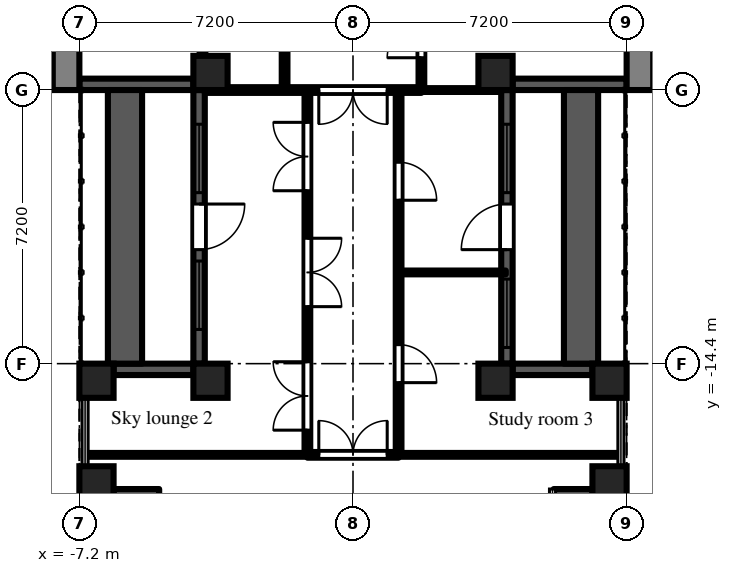
"""IFC4 building model, lengths in metres.
Left out: names, types, materials, properties, quantities, classifications, styles, units other than length and angle.
Written with IfcOpenShell. Run it as: python <this file> out.ifc"""

import sys

from ifc_helpers import new_model, si_unit, direction, frame, frame_2d, origin, origin_2d, place, context, subcontext, project, spatial, rectangle, extrude, element, fill, save


model = new_model("IFC4")
c1 = context("Model", 3, precision=1e-05, world=origin(), true_north=direction((0.0, 1.0)))
c2 = subcontext(c1, "Body", "Model", "MODEL_VIEW")
j1 = project(units=[si_unit("LENGTHUNIT", "METRE"), si_unit("PLANEANGLEUNIT", "RADIAN")], contexts=[c1])
p1 = place(None, origin())
s1 = spatial("IfcSite", under=j1, at=p1, CompositionType="ELEMENT")
p2 = place(p1, origin())
s2 = spatial("IfcBuilding", under=s1, at=p2, CompositionType="ELEMENT")
p3 = place(p2, frame((0.0, 0.0, 116.1)))
s3 = spatial("IfcBuildingStorey", under=s2, at=p3, CompositionType="ELEMENT", Elevation=116.1)
for number, where, z_axis, x_axis in (
    (1, (-6.75, -17.55, 0.0), (0.0, 0.0, 1.0), (1.0, 0.0, 0.0)),
    (2, (-6.75, -14.85, 0.0), (0.0, 0.0, 1.0), (1.0, 0.0, 0.0)),
    (3, (-3.75, -14.85, 0.0), (0.0, 0.0, 1.0), (1.0, 0.0, 0.0)),
    (4, (-3.75, -6.75, 0.0), (0.0, 0.0, 1.0), (1.0, 0.0, 0.0)),
    (5, (3.75, -14.85, 0.0), (0.0, 0.0, 1.0), (1.0, 0.0, 0.0)),
    (6, (3.75, -6.75, 0.0), (0.0, 0.0, 1.0), (1.0, 0.0, 0.0)),
    (7, (6.75, -17.55, 0.0), (0.0, 0.0, 1.0), (1.0, 0.0, 0.0)),
    (8, (6.75, -14.85, 0.0), (0.0, 0.0, 1.0), (1.0, 0.0, 0.0)),
):
    element("IfcColumn", number, at=place(p3, frame(where, z_axis=z_axis, x_axis=x_axis)), inside=s3, PredefinedType="COLUMN", context=c2, shape_type="SweptSolid", body=[
        extrude(rectangle(XDim=0.9, YDim=0.9, at=origin_2d()), origin(), (0.0, 0.0, 1.0), 4.2),
    ])
p4 = place(p3, frame((-7.2, -7.05, 0.0), z_axis=(0.0, 0.0, 1.0), x_axis=(1.0, 0.0, 0.0)))
e9 = element("IfcWall", 9, at=p4, inside=s3, PredefinedType="SOLIDWALL", context=c2, shape_type="SweptSolid", body=[
    extrude(rectangle(XDim=3.0, YDim=0.3, at=frame_2d((1.5, 0.0))), origin(), (0.0, 0.0, 1.0), 3.4),
])
p5 = place(p3, frame((-4.05, -7.2, 0.0), z_axis=(0.0, 0.0, 1.0), x_axis=(0.0, -1.0, 0.0)))
e10 = element("IfcWall", 10, at=p5, inside=s3, PredefinedType="SOLIDWALL", context=c2, shape_type="SweptSolid", body=[
    extrude(rectangle(XDim=7.2, YDim=0.3, at=frame_2d((3.6, 0.0))), origin(), (0.0, 0.0, 1.0), 3.4),
])
p6 = place(p5, frame((3.0, 0.0, 0.0)))
e11 = element("IfcOpeningElement", 11, at=p6, cuts=e10, PredefinedType="OPENING", context=c2, shape_type="SweptSolid", body=[
    extrude(rectangle(XDim=1.2, YDim=2.05, at=frame_2d((0.6, 1.025))), frame((0.0, 0.16, 0.0), z_axis=(0.0, -1.0, 0.0), x_axis=(1.0, 0.0, 0.0)), (0.0, 0.0, 1.0), 0.32),
])
p7 = place(p5, frame((0.9, 0.0, 0.2)))
e12 = element("IfcOpeningElement", 12, at=p7, cuts=e10, PredefinedType="OPENING", context=c2, shape_type="SweptSolid", body=[
    extrude(rectangle(XDim=1.8, YDim=1.85, at=frame_2d((0.9, 0.925))), frame((0.0, 0.16, 0.0), z_axis=(0.0, -1.0, 0.0), x_axis=(1.0, 0.0, 0.0)), (0.0, 0.0, 1.0), 0.32),
])
p8 = place(p5, frame((4.5, 0.0, 0.2)))
e13 = element("IfcOpeningElement", 13, at=p8, cuts=e10, PredefinedType="OPENING", context=c2, shape_type="SweptSolid", body=[
    extrude(rectangle(XDim=1.8, YDim=1.85, at=frame_2d((0.9, 0.925))), frame((0.0, 0.16, 0.0), z_axis=(0.0, -1.0, 0.0), x_axis=(1.0, 0.0, 0.0)), (0.0, 0.0, 1.0), 0.32),
])
p9 = place(p3, frame((-4.2, -14.55, 0.0), z_axis=(0.0, 0.0, 1.0), x_axis=(-1.0, 0.0, 0.0)))
e14 = element("IfcWall", 14, at=p9, inside=s3, PredefinedType="SOLIDWALL", context=c2, shape_type="SweptSolid", body=[
    extrude(rectangle(XDim=2.1, YDim=0.3, at=frame_2d((1.05, 0.0))), origin(), (0.0, 0.0, 1.0), 3.4),
])
p10 = place(p3, frame((-6.3, -17.85, 0.0), z_axis=(0.0, 0.0, 1.0), x_axis=(1.0, 0.0, 0.0)))
e15 = element("IfcWall", 15, at=p10, inside=s3, PredefinedType="SOLIDWALL", context=c2, shape_type="SweptSolid", body=[
    extrude(rectangle(XDim=1.2, YDim=0.3, at=frame_2d((0.6, 0.0))), origin(), (0.0, 0.0, 1.0), 3.8),
])
p11 = place(p3, frame((5.28, -17.85, 0.0), z_axis=(0.0, 0.0, 1.0), x_axis=(1.0, 0.0, 0.0)))
e16 = element("IfcWall", 16, at=p11, inside=s3, PredefinedType="SOLIDWALL", context=c2, shape_type="SweptSolid", body=[
    extrude(rectangle(XDim=1.02, YDim=0.3, at=frame_2d((0.51, 0.0))), origin(), (0.0, 0.0, 1.0), 3.8),
])
p12 = place(p3, frame((6.3, -14.55, 0.0), z_axis=(0.0, 0.0, 1.0), x_axis=(-1.0, 0.0, 0.0)))
e17 = element("IfcWall", 17, at=p12, inside=s3, PredefinedType="SOLIDWALL", context=c2, shape_type="SweptSolid", body=[
    extrude(rectangle(XDim=2.1, YDim=0.3, at=frame_2d((1.05, 0.0))), origin(), (0.0, 0.0, 1.0), 3.4),
])
p13 = place(p3, frame((4.05, -14.4, 0.0), z_axis=(0.0, 0.0, 1.0), x_axis=(0.0, 1.0, 0.0)))
e18 = element("IfcWall", 18, at=p13, inside=s3, PredefinedType="SOLIDWALL", context=c2, shape_type="SweptSolid", body=[
    extrude(rectangle(XDim=7.2, YDim=0.3, at=frame_2d((3.6, 0.0))), origin(), (0.0, 0.0, 1.0), 3.4),
])
p14 = place(p13, frame((3.0, 0.0, 0.0)))
e19 = element("IfcOpeningElement", 19, at=p14, cuts=e18, PredefinedType="OPENING", context=c2, shape_type="SweptSolid", body=[
    extrude(rectangle(XDim=1.2, YDim=2.05, at=frame_2d((0.6, 1.025))), frame((0.0, 0.16, 0.0), z_axis=(0.0, -1.0, 0.0), x_axis=(1.0, 0.0, 0.0)), (0.0, 0.0, 1.0), 0.32),
])
p15 = place(p13, frame((0.425, 0.0, 0.2)))
e20 = element("IfcOpeningElement", 20, at=p15, cuts=e18, PredefinedType="OPENING", context=c2, shape_type="SweptSolid", body=[
    extrude(rectangle(XDim=1.8, YDim=1.85, at=frame_2d((0.9, 0.925))), frame((0.0, 0.16, 0.0), z_axis=(0.0, -1.0, 0.0), x_axis=(1.0, 0.0, 0.0)), (0.0, 0.0, 1.0), 0.32),
])
p16 = place(p13, frame((4.5, 0.0, 0.2)))
e21 = element("IfcOpeningElement", 21, at=p16, cuts=e18, PredefinedType="OPENING", context=c2, shape_type="SweptSolid", body=[
    extrude(rectangle(XDim=1.8, YDim=1.85, at=frame_2d((0.9, 0.925))), frame((0.0, 0.16, 0.0), z_axis=(0.0, -1.0, 0.0), x_axis=(1.0, 0.0, 0.0)), (0.0, 0.0, 1.0), 0.32),
])
p17 = place(p3, frame((4.2, -7.05, 0.0), z_axis=(0.0, 0.0, 1.0), x_axis=(1.0, 0.0, 0.0)))
e22 = element("IfcWall", 22, at=p17, inside=s3, PredefinedType="SOLIDWALL", context=c2, shape_type="SweptSolid", body=[
    extrude(rectangle(XDim=3.0, YDim=0.3, at=frame_2d((1.5, 0.0))), origin(), (0.0, 0.0, 1.0), 3.4),
])
for number, where, z_axis, x_axis in (
    (23, (6.0, -14.4, 0.0), (0.0, 0.0, 1.0), (0.0, 1.0, 0.0)),
    (24, (-6.0, -14.4, 0.0), (0.0, 0.0, 1.0), (0.0, 1.0, 0.0)),
):
    element("IfcWall", number, at=place(p3, frame(where, z_axis=z_axis, x_axis=x_axis)), inside=s3, PredefinedType="PARAPET", context=c2, shape_type="SweptSolid", body=[
        extrude(rectangle(XDim=7.2, YDim=0.9, at=frame_2d((3.6, 0.0))), origin(), (0.0, 0.0, 1.0), 0.8),
    ])
p18 = place(p3, frame((7.55, -7.2, 0.0), z_axis=(0.0, 0.0, 1.0), x_axis=(0.0, 1.0, 0.0)))
e25 = element("IfcWall", 25, at=p18, inside=s3, PredefinedType="SHEAR", context=c2, shape_type="SweptSolid", body=[
    extrude(rectangle(XDim=14.4, YDim=0.7, at=frame_2d((7.2, 0.0))), origin(), (0.0, 0.0, 1.0), 3.8),
])
p19 = place(p18, frame((6.0, 0.0, 0.0)))
e26 = element("IfcOpeningElement", 26, at=p19, cuts=e25, PredefinedType="OPENING", context=c2, shape_type="SweptSolid", body=[
    extrude(rectangle(XDim=2.4, YDim=2.2, at=frame_2d((1.2, 1.1))), frame((0.0, 0.36, 0.0), z_axis=(0.0, -1.0, 0.0), x_axis=(1.0, 0.0, 0.0)), (0.0, 0.0, 1.0), 0.72),
])
p20 = place(p3, frame((-7.55, -7.2, 0.0), z_axis=(0.0, 0.0, 1.0), x_axis=(0.0, 1.0, 0.0)))
e27 = element("IfcWall", 27, at=p20, inside=s3, PredefinedType="SHEAR", context=c2, shape_type="SweptSolid", body=[
    extrude(rectangle(XDim=14.4, YDim=0.7, at=frame_2d((7.2, 0.0))), origin(), (0.0, 0.0, 1.0), 3.8),
])
p21 = place(p20, frame((6.0, 0.0, 0.0)))
e28 = element("IfcOpeningElement", 28, at=p21, cuts=e27, PredefinedType="OPENING", context=c2, shape_type="SweptSolid", body=[
    extrude(rectangle(XDim=2.4, YDim=2.2, at=frame_2d((1.2, 1.1))), frame((0.0, 0.36, 0.0), z_axis=(0.0, -1.0, 0.0), x_axis=(1.0, 0.0, 0.0)), (0.0, 0.0, 1.0), 0.72),
])
p22 = place(p3, frame((-7.02, -16.8, 0.0), z_axis=(0.0, 0.0, 1.0), x_axis=(1.0, 0.0, 0.0)))
e29 = element("IfcWall", 29, at=p22, inside=s3, PredefinedType="PARTITIONING", context=c2, shape_type="SweptSolid", body=[
    extrude(rectangle(XDim=5.82, YDim=0.1, at=frame_2d((2.91, 0.0))), origin(), (0.0, 0.0, 1.0), 3.8),
])
p23 = place(p3, frame((-3.96, -6.9, 0.0), z_axis=(0.0, 0.0, 1.0), x_axis=(0.0, 1.0, 0.0)))
e30 = element("IfcWall", 30, at=p23, inside=s3, PredefinedType="PARTITIONING", context=c2, shape_type="SweptSolid", body=[
    extrude(rectangle(XDim=5.025, YDim=0.15, at=frame_2d((2.512, 0.0))), origin(), (0.0, 0.0, 1.0), 3.8),
])
p24 = place(p23, frame((3.55, 0.0, 0.0)))
e31 = element("IfcOpeningElement", 31, at=p24, cuts=e30, PredefinedType="OPENING", context=c2, shape_type="SweptSolid", body=[
    extrude(rectangle(XDim=0.9, YDim=2.1, at=frame_2d((0.45, 1.05))), frame((0.0, 0.085, 0.0), z_axis=(0.0, -1.0, 0.0), x_axis=(1.0, 0.0, 0.0)), (0.0, 0.0, 1.0), 0.17),
])
p25 = place(p3, frame((-3.9, -7.2, 0.0), z_axis=(0.0, 0.0, 1.0), x_axis=(1.0, 0.0, 0.0)))
e32 = element("IfcWall", 32, at=p25, inside=s3, PredefinedType="PARTITIONING", context=c2, shape_type="SweptSolid", body=[
    extrude(rectangle(XDim=5.7, YDim=0.15, at=frame_2d((2.85, 0.0))), origin(), (0.0, 0.0, 1.0), 3.8),
])
p26 = place(p25, frame((3.0, 0.0, 0.0)))
e33 = element("IfcOpeningElement", 33, at=p26, cuts=e32, PredefinedType="OPENING", context=c2, shape_type="SweptSolid", body=[
    extrude(rectangle(XDim=1.8, YDim=2.1, at=frame_2d((0.9, 1.05))), frame((0.0, 0.085, 0.0), z_axis=(0.0, -1.0, 0.0), x_axis=(1.0, 0.0, 0.0)), (0.0, 0.0, 1.0), 0.17),
])
p27 = place(p3, frame((-1.8, -7.125, 0.0), z_axis=(0.0, 0.0, 1.0), x_axis=(0.0, 1.0, 0.0)))
e34 = element("IfcWall", 34, at=p27, inside=s3, PredefinedType="PARTITIONING", context=c2, shape_type="SweptSolid", body=[
    extrude(rectangle(XDim=5.4, YDim=0.15, at=frame_2d((2.7, 0.0))), origin(), (0.0, 0.0, 1.0), 3.8),
])
p28 = place(p27, frame((3.255, 0.0, 0.0)))
e35 = element("IfcOpeningElement", 35, at=p28, cuts=e34, PredefinedType="OPENING", context=c2, shape_type="SweptSolid", body=[
    extrude(rectangle(XDim=0.9, YDim=2.1, at=frame_2d((0.45, 1.05))), frame((0.0, 0.085, 0.0), z_axis=(0.0, -1.0, 0.0), x_axis=(1.0, 0.0, 0.0)), (0.0, 0.0, 1.0), 0.17),
])
p29 = place(p3, frame((-1.2, -16.725, 0.0), z_axis=(0.0, 0.0, 1.0), x_axis=(0.0, 1.0, 0.0)))
e36 = element("IfcWall", 36, at=p29, inside=s3, PredefinedType="PARTITIONING", context=c2, shape_type="SweptSolid", body=[
    extrude(rectangle(XDim=9.45, YDim=0.15, at=frame_2d((4.725, 0.0))), origin(), (0.0, 0.0, 1.0), 3.8),
])
p30 = place(p29, frame((0.575, 0.0, 0.0)))
e37 = element("IfcOpeningElement", 37, at=p30, cuts=e36, PredefinedType="OPENING", context=c2, shape_type="SweptSolid", body=[
    extrude(rectangle(XDim=1.8, YDim=2.1, at=frame_2d((0.9, 1.05))), frame((0.0, 0.085, 0.0), z_axis=(0.0, -1.0, 0.0), x_axis=(1.0, 0.0, 0.0)), (0.0, 0.0, 1.0), 0.17),
])
p31 = place(p29, frame((3.825, 0.0, 0.0)))
e38 = element("IfcOpeningElement", 38, at=p31, cuts=e36, PredefinedType="OPENING", context=c2, shape_type="SweptSolid", body=[
    extrude(rectangle(XDim=1.8, YDim=2.1, at=frame_2d((0.9, 1.05))), frame((0.0, 0.085, 0.0), z_axis=(0.0, -1.0, 0.0), x_axis=(1.0, 0.0, 0.0)), (0.0, 0.0, 1.0), 0.17),
])
p32 = place(p29, frame((6.875, 0.0, 0.0)))
e39 = element("IfcOpeningElement", 39, at=p32, cuts=e36, PredefinedType="OPENING", context=c2, shape_type="SweptSolid", body=[
    extrude(rectangle(XDim=1.8, YDim=2.1, at=frame_2d((0.9, 1.05))), frame((0.0, 0.085, 0.0), z_axis=(0.0, -1.0, 0.0), x_axis=(1.0, 0.0, 0.0)), (0.0, 0.0, 1.0), 0.17),
])
p33 = place(p3, frame((-1.2, -16.8, 0.0), z_axis=(0.0, 0.0, 1.0), x_axis=(1.0, 0.0, 0.0)))
e40 = element("IfcWall", 40, at=p33, inside=s3, PredefinedType="PARTITIONING", context=c2, shape_type="SweptSolid", body=[
    extrude(rectangle(XDim=2.4, YDim=0.15, at=frame_2d((1.2, 0.0))), origin(), (0.0, 0.0, 1.0), 3.8),
])
p34 = place(p33, frame((0.3, 0.0, 0.0)))
e41 = element("IfcOpeningElement", 41, at=p34, cuts=e40, PredefinedType="OPENING", context=c2, shape_type="SweptSolid", body=[
    extrude(rectangle(XDim=1.8, YDim=2.1, at=frame_2d((0.9, 1.05))), frame((0.0, 0.085, 0.0), z_axis=(0.0, -1.0, 0.0), x_axis=(1.0, 0.0, 0.0)), (0.0, 0.0, 1.0), 0.17),
])
p35 = place(p3, frame((1.2, -16.725, 0.0), z_axis=(0.0, 0.0, 1.0), x_axis=(0.0, 1.0, 0.0)))
e42 = element("IfcWall", 42, at=p35, inside=s3, PredefinedType="PARTITIONING", context=c2, shape_type="SweptSolid", body=[
    extrude(rectangle(XDim=9.45, YDim=0.15, at=frame_2d((4.725, 0.0))), origin(), (0.0, 0.0, 1.0), 3.8),
])
p36 = place(p35, frame((6.625, 0.0, 0.0)))
e43 = element("IfcOpeningElement", 43, at=p36, cuts=e42, PredefinedType="OPENING", context=c2, shape_type="SweptSolid", body=[
    extrude(rectangle(XDim=1.0, YDim=2.1, at=frame_2d((0.5, 1.05))), frame((0.0, 0.085, 0.0), z_axis=(0.0, -1.0, 0.0), x_axis=(1.0, 0.0, 0.0)), (0.0, 0.0, 1.0), 0.17),
])
p37 = place(p35, frame((1.825, 0.0, 0.0)))
e44 = element("IfcOpeningElement", 44, at=p37, cuts=e42, PredefinedType="OPENING", context=c2, shape_type="SweptSolid", body=[
    extrude(rectangle(XDim=1.0, YDim=2.1, at=frame_2d((0.5, 1.05))), frame((0.0, 0.085, 0.0), z_axis=(0.0, -1.0, 0.0), x_axis=(1.0, 0.0, 0.0)), (0.0, 0.0, 1.0), 0.17),
])
p38 = place(p3, frame((1.2, -16.8, 0.0), z_axis=(0.0, 0.0, 1.0), x_axis=(1.0, 0.0, 0.0)))
e45 = element("IfcWall", 45, at=p38, inside=s3, PredefinedType="PARTITIONING", context=c2, shape_type="SweptSolid", body=[
    extrude(rectangle(XDim=5.82, YDim=0.1, at=frame_2d((2.91, 0.0))), origin(), (0.0, 0.0, 1.0), 3.8),
])
p39 = place(p3, frame((1.275, -12.0, 0.0), z_axis=(0.0, 0.0, 1.0), x_axis=(1.0, 0.0, 0.0)))
e46 = element("IfcWall", 46, at=p39, inside=s3, PredefinedType="PARTITIONING", context=c2, shape_type="SweptSolid", body=[
    extrude(rectangle(XDim=2.745, YDim=0.1, at=frame_2d((1.373, 0.0))), origin(), (0.0, 0.0, 1.0), 3.8),
])
p40 = place(p3, frame((1.8, -7.125, 0.0), z_axis=(0.0, 0.0, 1.0), x_axis=(0.0, 1.0, 0.0)))
e47 = element("IfcWall", 47, at=p40, inside=s3, PredefinedType="PARTITIONING", context=c2, shape_type="SweptSolid", body=[
    extrude(rectangle(XDim=5.4, YDim=0.15, at=frame_2d((2.7, 0.0))), origin(), (0.0, 0.0, 1.0), 3.8),
])
p41 = place(p40, frame((0.775, 0.0, 0.0)))
e48 = element("IfcOpeningElement", 48, at=p41, cuts=e47, PredefinedType="OPENING", context=c2, shape_type="SweptSolid", body=[
    extrude(rectangle(XDim=1.8, YDim=2.1, at=frame_2d((0.9, 1.05))), frame((0.0, 0.085, 0.0), z_axis=(0.0, -1.0, 0.0), x_axis=(1.0, 0.0, 0.0)), (0.0, 0.0, 1.0), 0.17),
])
p42 = place(p3, frame((1.8, -7.2, 0.0), z_axis=(0.0, 0.0, 1.0), x_axis=(1.0, 0.0, 0.0)))
e49 = element("IfcWall", 49, at=p42, inside=s3, PredefinedType="PARTITIONING", context=c2, shape_type="SweptSolid", body=[
    extrude(rectangle(XDim=2.1, YDim=0.1, at=frame_2d((1.05, 0.0))), origin(), (0.0, 0.0, 1.0), 3.8),
])
p43 = place(p6, origin())
e50 = element("IfcDoor", 50, at=p43, inside=s3, OperationType="SINGLE_SWING_LEFT", PredefinedType="DOOR", context=c2, shape_type="SweptSolid", body=[
    extrude(rectangle(XDim=1.2, YDim=2.05, at=frame_2d((0.6, 1.025))), frame((0.0, 0.025, 0.0), z_axis=(0.0, -1.0, 0.0), x_axis=(1.0, 0.0, 0.0)), (0.0, 0.0, 1.0), 0.05),
])
fill(e11, e50)
p44 = place(p7, origin())
e51 = element("IfcWindow", 51, at=p44, inside=s3, PartitioningType="SINGLE_PANEL", PredefinedType="WINDOW", context=c2, shape_type="SweptSolid", body=[
    extrude(rectangle(XDim=1.8, YDim=1.85, at=frame_2d((0.9, 0.925))), frame((0.0, 0.03, 0.0), z_axis=(0.0, -1.0, 0.0), x_axis=(1.0, 0.0, 0.0)), (0.0, 0.0, 1.0), 0.06),
])
fill(e12, e51)
p45 = place(p8, origin())
e52 = element("IfcWindow", 52, at=p45, inside=s3, PartitioningType="SINGLE_PANEL", PredefinedType="WINDOW", context=c2, shape_type="SweptSolid", body=[
    extrude(rectangle(XDim=1.8, YDim=1.85, at=frame_2d((0.9, 0.925))), frame((0.0, 0.03, 0.0), z_axis=(0.0, -1.0, 0.0), x_axis=(1.0, 0.0, 0.0)), (0.0, 0.0, 1.0), 0.06),
])
fill(e13, e52)
p46 = place(p14, origin())
e53 = element("IfcDoor", 53, at=p46, inside=s3, OperationType="SINGLE_SWING_LEFT", PredefinedType="DOOR", context=c2, shape_type="SweptSolid", body=[
    extrude(rectangle(XDim=1.2, YDim=2.05, at=frame_2d((0.6, 1.025))), frame((0.0, 0.025, 0.0), z_axis=(0.0, -1.0, 0.0), x_axis=(1.0, 0.0, 0.0)), (0.0, 0.0, 1.0), 0.05),
])
fill(e19, e53)
p47 = place(p15, origin())
e54 = element("IfcWindow", 54, at=p47, inside=s3, PartitioningType="SINGLE_PANEL", PredefinedType="WINDOW", context=c2, shape_type="SweptSolid", body=[
    extrude(rectangle(XDim=1.8, YDim=1.85, at=frame_2d((0.9, 0.925))), frame((0.0, 0.03, 0.0), z_axis=(0.0, -1.0, 0.0), x_axis=(1.0, 0.0, 0.0)), (0.0, 0.0, 1.0), 0.06),
])
fill(e20, e54)
p48 = place(p16, origin())
e55 = element("IfcWindow", 55, at=p48, inside=s3, PartitioningType="SINGLE_PANEL", PredefinedType="WINDOW", context=c2, shape_type="SweptSolid", body=[
    extrude(rectangle(XDim=1.8, YDim=1.85, at=frame_2d((0.9, 0.925))), frame((0.0, 0.03, 0.0), z_axis=(0.0, -1.0, 0.0), x_axis=(1.0, 0.0, 0.0)), (0.0, 0.0, 1.0), 0.06),
])
fill(e21, e55)
p49 = place(p41, origin())
e56 = element("IfcDoor", 56, at=p49, inside=s3, OperationType="DOUBLE_DOOR_DOUBLE_SWING", PredefinedType="DOOR", context=c2, shape_type="SweptSolid", body=[
    extrude(rectangle(XDim=1.8, YDim=2.1, at=frame_2d((0.9, 1.05))), frame((0.0, 0.025, 0.0), z_axis=(0.0, -1.0, 0.0), x_axis=(1.0, 0.0, 0.0)), (0.0, 0.0, 1.0), 0.05),
])
fill(e48, e56)
p50 = place(p26, frame((1.8, 0.0, 0.0), z_axis=(0.0, 0.0, 1.0), x_axis=(-1.0, 0.0, 0.0)))
e57 = element("IfcDoor", 57, at=p50, inside=s3, OperationType="DOUBLE_DOOR_DOUBLE_SWING", PredefinedType="DOOR", context=c2, shape_type="SweptSolid", body=[
    extrude(rectangle(XDim=1.8, YDim=2.1, at=frame_2d((0.9, 1.05))), frame((0.0, 0.025, 0.0), z_axis=(0.0, -1.0, 0.0), x_axis=(1.0, 0.0, 0.0)), (0.0, 0.0, 1.0), 0.05),
])
fill(e33, e57)
p51 = place(p34, origin())
e58 = element("IfcDoor", 58, at=p51, inside=s3, OperationType="DOUBLE_DOOR_DOUBLE_SWING", PredefinedType="DOOR", context=c2, shape_type="SweptSolid", body=[
    extrude(rectangle(XDim=1.8, YDim=2.1, at=frame_2d((0.9, 1.05))), frame((0.0, 0.025, 0.0), z_axis=(0.0, -1.0, 0.0), x_axis=(1.0, 0.0, 0.0)), (0.0, 0.0, 1.0), 0.05),
])
fill(e41, e58)
p52 = place(p36, frame((1.0, 0.0, 0.0), z_axis=(0.0, 0.0, 1.0), x_axis=(-1.0, 0.0, 0.0)))
e59 = element("IfcDoor", 59, at=p52, inside=s3, OperationType="SINGLE_SWING_RIGHT", PredefinedType="DOOR", context=c2, shape_type="SweptSolid", body=[
    extrude(rectangle(XDim=1.0, YDim=2.1, at=frame_2d((0.5, 1.05))), frame((0.0, 0.025, 0.0), z_axis=(0.0, -1.0, 0.0), x_axis=(1.0, 0.0, 0.0)), (0.0, 0.0, 1.0), 0.05),
])
fill(e43, e59)
p53 = place(p37, frame((1.0, 0.0, 0.0), z_axis=(0.0, 0.0, 1.0), x_axis=(-1.0, 0.0, 0.0)))
e60 = element("IfcDoor", 60, at=p53, inside=s3, OperationType="SINGLE_SWING_RIGHT", PredefinedType="DOOR", context=c2, shape_type="SweptSolid", body=[
    extrude(rectangle(XDim=1.0, YDim=2.1, at=frame_2d((0.5, 1.05))), frame((0.0, 0.025, 0.0), z_axis=(0.0, -1.0, 0.0), x_axis=(1.0, 0.0, 0.0)), (0.0, 0.0, 1.0), 0.05),
])
fill(e44, e60)
p54 = place(p30, origin())
e61 = element("IfcDoor", 61, at=p54, inside=s3, OperationType="DOUBLE_DOOR_DOUBLE_SWING", PredefinedType="DOOR", context=c2, shape_type="SweptSolid", body=[
    extrude(rectangle(XDim=1.8, YDim=2.1, at=frame_2d((0.9, 1.05))), frame((0.0, 0.025, 0.0), z_axis=(0.0, -1.0, 0.0), x_axis=(1.0, 0.0, 0.0)), (0.0, 0.0, 1.0), 0.05),
])
fill(e37, e61)
p55 = place(p31, frame((1.8, 0.0, 0.0), z_axis=(0.0, 0.0, 1.0), x_axis=(-1.0, 0.0, 0.0)))
e62 = element("IfcDoor", 62, at=p55, inside=s3, OperationType="DOUBLE_DOOR_DOUBLE_SWING", PredefinedType="DOOR", context=c2, shape_type="SweptSolid", body=[
    extrude(rectangle(XDim=1.8, YDim=2.1, at=frame_2d((0.9, 1.05))), frame((0.0, 0.025, 0.0), z_axis=(0.0, -1.0, 0.0), x_axis=(1.0, 0.0, 0.0)), (0.0, 0.0, 1.0), 0.05),
])
fill(e38, e62)
p56 = place(p32, origin())
e63 = element("IfcDoor", 63, at=p56, inside=s3, OperationType="DOUBLE_DOOR_DOUBLE_SWING", PredefinedType="DOOR", context=c2, shape_type="SweptSolid", body=[
    extrude(rectangle(XDim=1.8, YDim=2.1, at=frame_2d((0.9, 1.05))), frame((0.0, 0.025, 0.0), z_axis=(0.0, -1.0, 0.0), x_axis=(1.0, 0.0, 0.0)), (0.0, 0.0, 1.0), 0.05),
])
fill(e39, e63)
save(model, sys.argv[1])
